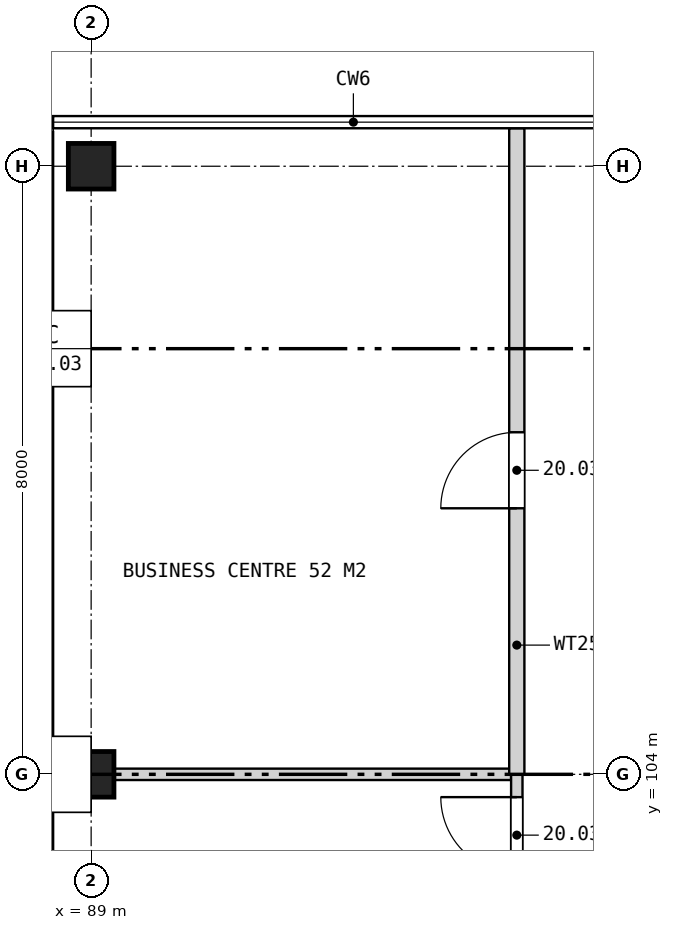
"""IFC4 building model, lengths in metres.
Left out: names, types, materials, properties, quantities, classifications, styles, units other than length and angle.
Written with IfcOpenShell. Run it as: python <this file> out.ifc"""

import sys

from ifc_helpers import new_model, si_unit, direction, frame, frame_2d, origin, origin_2d, place, context, subcontext, project, spatial, rectangle, extrude, element, fill, save


model = new_model("IFC4")
c1 = context("Model", 3, precision=1e-05, world=origin(), true_north=direction((0.0, 1.0)))
c2 = subcontext(c1, "Body", "Model", "MODEL_VIEW")
j1 = project(units=[si_unit("LENGTHUNIT", "METRE"), si_unit("PLANEANGLEUNIT", "RADIAN")], contexts=[c1])
p1 = place(None, origin())
s1 = spatial("IfcSite", under=j1, at=p1, CompositionType="ELEMENT")
p2 = place(p1, origin())
s2 = spatial("IfcBuilding", under=s1, at=p2, CompositionType="ELEMENT")
p3 = place(p2, frame((0.0, 0.0, 101.6)))
s3 = spatial("IfcBuildingStorey", under=s2, at=p3, CompositionType="ELEMENT", Elevation=101.6)
for number, where, z_axis, x_axis in (
    (1, (89.0, 104.0, 0.0), (0.0, 0.0, 1.0), (1.0, 0.0, 0.0)),
    (2, (89.0, 112.0, 0.0), (0.0, 0.0, 1.0), (1.0, 0.0, 0.0)),
):
    element("IfcColumn", number, at=place(p3, frame(where, z_axis=z_axis, x_axis=x_axis)), inside=s3, PredefinedType="COLUMN", context=c2, shape_type="SweptSolid", body=[
        extrude(rectangle(XDim=0.6, YDim=0.6, at=origin_2d()), origin(), (0.0, 0.0, 1.0), 3.7),
    ])
p4 = place(p3, frame((89.3, 104.0, 0.0), z_axis=(0.0, 0.0, 1.0), x_axis=(1.0, 0.0, 0.0)))
e3 = element("IfcWall", 3, at=p4, inside=s3, PredefinedType="PARTITIONING", context=c2, shape_type="SweptSolid", body=[
    extrude(rectangle(XDim=5.225, YDim=0.15, at=frame_2d((2.612, 0.0))), origin(), (0.0, 0.0, 1.0), 2.755),
])
p5 = place(p3, frame((94.6, 96.0, 0.0), z_axis=(0.0, 0.0, 1.0), x_axis=(0.0, 1.0, 0.0)))
e4 = element("IfcWall", 4, at=p5, inside=s3, PredefinedType="PARTITIONING", context=c2, shape_type="SweptSolid", body=[
    extrude(rectangle(XDim=8.0, YDim=0.15, at=frame_2d((4.0, 0.0))), origin(), (0.0, 0.0, 1.0), 2.755),
])
p6 = place(p5, frame((0.3, 0.0, 0.0)))
e5 = element("IfcOpeningElement", 5, at=p6, cuts=e4, PredefinedType="OPENING", context=c2, shape_type="SweptSolid", body=[
    extrude(rectangle(XDim=1.0, YDim=2.1, at=frame_2d((0.5, 1.05))), frame((0.0, 0.085, 0.0), z_axis=(0.0, -1.0, 0.0), x_axis=(1.0, 0.0, 0.0)), (0.0, 0.0, 1.0), 0.17),
])
p7 = place(p5, frame((6.7, 0.0, 0.0)))
e6 = element("IfcOpeningElement", 6, at=p7, cuts=e4, PredefinedType="OPENING", context=c2, shape_type="SweptSolid", body=[
    extrude(rectangle(XDim=1.0, YDim=2.1, at=frame_2d((0.5, 1.05))), frame((0.0, 0.085, 0.0), z_axis=(0.0, -1.0, 0.0), x_axis=(1.0, 0.0, 0.0)), (0.0, 0.0, 1.0), 0.17),
])
p8 = place(p3, frame((94.6, 104.0, 0.0), z_axis=(0.0, 0.0, 1.0), x_axis=(0.0, 1.0, 0.0)))
e7 = element("IfcWall", 7, at=p8, inside=s3, PredefinedType="PARTITIONING", context=c2, shape_type="SweptSolid", body=[
    extrude(rectangle(XDim=8.5, YDim=0.2, at=frame_2d((4.25, 0.0))), origin(), (0.0, 0.0, 1.0), 2.755),
])
p9 = place(p8, frame((3.5, 0.0, 0.0)))
e8 = element("IfcOpeningElement", 8, at=p9, cuts=e7, PredefinedType="OPENING", context=c2, shape_type="SweptSolid", body=[
    extrude(rectangle(XDim=1.0, YDim=2.1, at=frame_2d((0.5, 1.05))), frame((0.0, 0.11, 0.0), z_axis=(0.0, -1.0, 0.0), x_axis=(1.0, 0.0, 0.0)), (0.0, 0.0, 1.0), 0.22),
])
p10 = place(p7, origin())
e9 = element("IfcDoor", 9, at=p10, inside=s3, OperationType="SINGLE_SWING_RIGHT", PredefinedType="DOOR", context=c2, shape_type="SweptSolid", body=[
    extrude(rectangle(XDim=1.0, YDim=2.1, at=frame_2d((0.5, 1.05))), frame((0.0, 0.025, 0.0), z_axis=(0.0, -1.0, 0.0), x_axis=(1.0, 0.0, 0.0)), (0.0, 0.0, 1.0), 0.05),
])
fill(e6, e9)
p11 = place(p9, origin())
e10 = element("IfcDoor", 10, at=p11, inside=s3, OperationType="SINGLE_SWING_LEFT", PredefinedType="DOOR", context=c2, shape_type="SweptSolid", body=[
    extrude(rectangle(XDim=1.0, YDim=2.1, at=frame_2d((0.5, 1.05))), frame((0.0, 0.025, 0.0), z_axis=(0.0, -1.0, 0.0), x_axis=(1.0, 0.0, 0.0)), (0.0, 0.0, 1.0), 0.05),
])
fill(e8, e10)
save(model, sys.argv[1])
